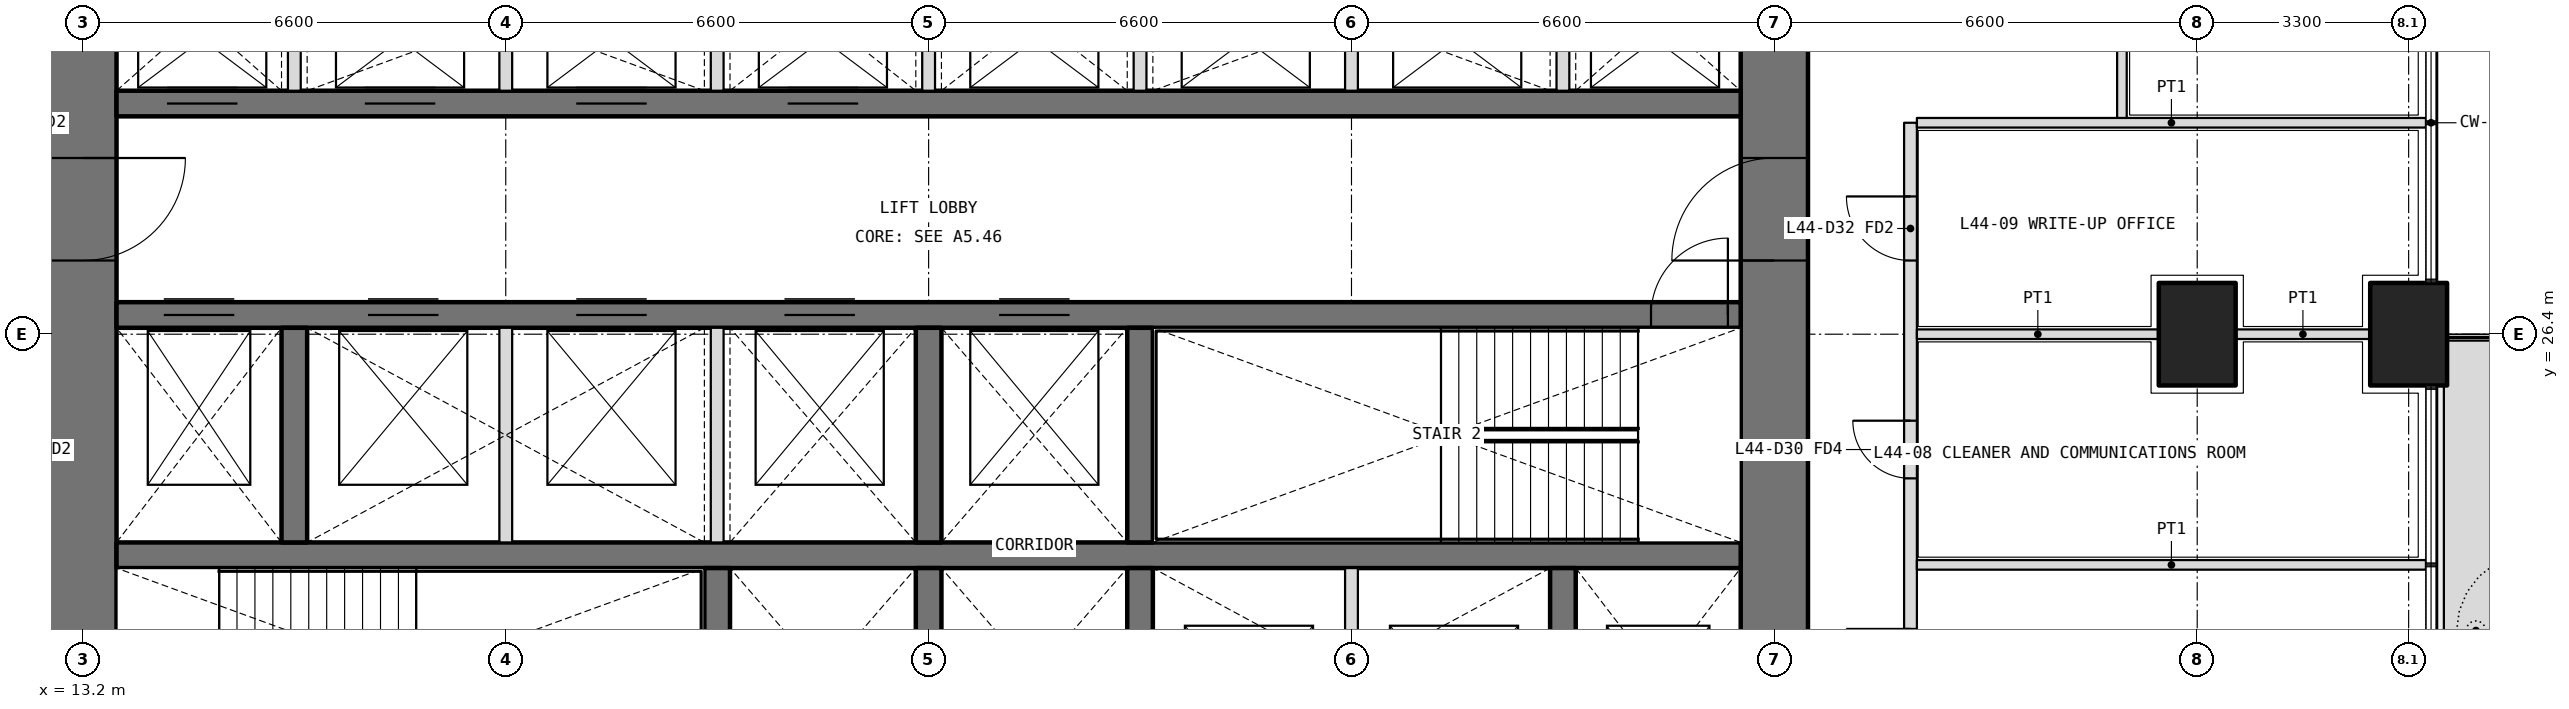
"""IFC4 building model, lengths in metres.
Left out: names, types, materials, properties, quantities, classifications, styles, units other than length and angle.
Written with IfcOpenShell. Run it as: python <this file> out.ifc"""

import sys

from ifc_helpers import new_model, si_unit, direction, frame, frame_2d, origin, origin_2d, place, context, subcontext, project, spatial, polyline, rectangle, outline, extrude, element, fill, save


model = new_model("IFC4")
c1 = context("Model", 3, precision=1e-05, world=origin(), true_north=direction((0.0, 1.0)))
c2 = subcontext(c1, "Body", "Model", "MODEL_VIEW")
j1 = project(units=[si_unit("LENGTHUNIT", "METRE"), si_unit("PLANEANGLEUNIT", "RADIAN")], contexts=[c1])
p1 = place(None, origin())
s1 = spatial("IfcSite", under=j1, at=p1, CompositionType="ELEMENT")
p2 = place(p1, origin())
s2 = spatial("IfcBuilding", under=s1, at=p2, CompositionType="ELEMENT")
p3 = place(p2, frame((0.0, 0.0, 193.5)))
s3 = spatial("IfcBuildingStorey", under=s2, at=p3, CompositionType="ELEMENT", Elevation=193.5)
for number, where, z_axis, x_axis in (
    (1, (49.5, 26.4, 0.0), (0.0, 0.0, 1.0), (0.0, 1.0, 0.0)),
    (2, (46.2, 26.4, 0.0), (0.0, 0.0, 1.0), (0.0, 1.0, 0.0)),
):
    element("IfcColumn", number, at=place(p3, frame(where, z_axis=z_axis, x_axis=x_axis)), inside=s3, PredefinedType="COLUMN", context=c2, shape_type="SweptSolid", body=[
        extrude(rectangle(XDim=1.6, YDim=1.2, at=origin_2d()), origin(), (0.0, 0.0, 1.0), 4.2),
    ])
p4 = place(p3, origin())
e3 = element("IfcWall", 3, at=p4, inside=s3, PredefinedType="USERDEFINED", context=c2, shape_type="SweptSolid", body=[
    extrude(outline(polyline([(50.05, 17.25), (51.05, 17.25), (51.05, 26.3), (50.05, 26.3), (50.05, 17.25)]), holes=[polyline([(50.2, 17.4), (50.9, 17.4), (50.9, 26.15), (50.2, 26.15), (50.2, 17.4)])]), origin(), (0.0, 0.0, 1.0), 1.05),
])
p5 = place(p3, frame((39.6, 13.725, 0.0), z_axis=(0.0, 0.0, 1.0), x_axis=(0.0, 1.0, 0.0)))
e4 = element("IfcWall", 4, at=p5, inside=s3, PredefinedType="SHEAR", context=c2, shape_type="SweptSolid", body=[
    extrude(rectangle(XDim=18.75, YDim=1.05, at=frame_2d((9.375, 0.0))), origin(), (0.0, 0.0, 1.0), 4.2),
])
p6 = place(p5, frame((3.025, 0.0, 0.0)))
e5 = element("IfcOpeningElement", 5, at=p6, cuts=e4, PredefinedType="OPENING", context=c2, shape_type="SweptSolid", body=[
    extrude(rectangle(XDim=1.6, YDim=2.1, at=frame_2d((0.8, 1.05))), frame((0.0, 0.535, 0.0), z_axis=(0.0, -1.0, 0.0), x_axis=(1.0, 0.0, 0.0)), (0.0, 0.0, 1.0), 1.07),
])
p7 = place(p5, frame((13.825, 0.0, 0.0)))
e6 = element("IfcOpeningElement", 6, at=p7, cuts=e4, PredefinedType="OPENING", context=c2, shape_type="SweptSolid", body=[
    extrude(rectangle(XDim=1.6, YDim=2.1, at=frame_2d((0.8, 1.05))), frame((0.0, 0.535, 0.0), z_axis=(0.0, -1.0, 0.0), x_axis=(1.0, 0.0, 0.0)), (0.0, 0.0, 1.0), 1.07),
])
p8 = place(p3, frame((13.2, 32.475, 0.0), z_axis=(0.0, 0.0, 1.0), x_axis=(0.0, -1.0, 0.0)))
e7 = element("IfcWall", 7, at=p8, inside=s3, PredefinedType="SHEAR", context=c2, shape_type="SweptSolid", body=[
    extrude(rectangle(XDim=18.75, YDim=1.05, at=frame_2d((9.375, 0.0))), origin(), (0.0, 0.0, 1.0), 4.2),
])
p9 = place(p8, frame((14.125, 0.0, 0.0)))
e8 = element("IfcOpeningElement", 8, at=p9, cuts=e7, PredefinedType="OPENING", context=c2, shape_type="SweptSolid", body=[
    extrude(rectangle(XDim=1.6, YDim=2.1, at=frame_2d((0.8, 1.05))), frame((0.0, 0.535, 0.0), z_axis=(0.0, -1.0, 0.0), x_axis=(1.0, 0.0, 0.0)), (0.0, 0.0, 1.0), 1.07),
])
p10 = place(p8, frame((3.325, 0.0, 0.0)))
e9 = element("IfcOpeningElement", 9, at=p10, cuts=e7, PredefinedType="OPENING", context=c2, shape_type="SweptSolid", body=[
    extrude(rectangle(XDim=1.6, YDim=2.1, at=frame_2d((0.8, 1.05))), frame((0.0, 0.535, 0.0), z_axis=(0.0, -1.0, 0.0), x_axis=(1.0, 0.0, 0.0)), (0.0, 0.0, 1.0), 1.07),
])
p11 = place(p3, frame((13.725, 22.95, 0.0), z_axis=(0.0, 0.0, 1.0), x_axis=(1.0, 0.0, 0.0)))
e10 = element("IfcWall", 10, at=p11, inside=s3, PredefinedType="SHEAR", context=c2, shape_type="SweptSolid", body=[
    extrude(rectangle(XDim=25.35, YDim=0.4, at=frame_2d((12.675, 0.0))), origin(), (0.0, 0.0, 1.0), 4.2),
])
p12 = place(p3, frame((13.725, 26.7, 0.0), z_axis=(0.0, 0.0, 1.0), x_axis=(1.0, 0.0, 0.0)))
e11 = element("IfcWall", 11, at=p12, inside=s3, PredefinedType="SHEAR", context=c2, shape_type="SweptSolid", body=[
    extrude(rectangle(XDim=25.35, YDim=0.4, at=frame_2d((12.675, 0.0))), origin(), (0.0, 0.0, 1.0), 4.2),
])
p13 = place(p12, frame((23.95, 0.0, 0.0)))
e12 = element("IfcOpeningElement", 12, at=p13, cuts=e11, PredefinedType="OPENING", context=c2, shape_type="SweptSolid", body=[
    extrude(rectangle(XDim=1.2, YDim=2.1, at=frame_2d((0.6, 1.05))), frame((0.0, 0.21, 0.0), z_axis=(0.0, -1.0, 0.0), x_axis=(1.0, 0.0, 0.0)), (0.0, 0.0, 1.0), 0.42),
])
p14 = place(p12, frame((0.738, 0.0, 0.0)))
e13 = element("IfcOpeningElement", 13, at=p14, cuts=e11, PredefinedType="OPENING", context=c2, shape_type="SweptSolid", body=[
    extrude(rectangle(XDim=1.1, YDim=2.1, at=frame_2d((0.55, 1.05))), frame((0.0, 0.21, 0.0), z_axis=(0.0, -1.0, 0.0), x_axis=(1.0, 0.0, 0.0)), (0.0, 0.0, 1.0), 0.42),
])
p15 = place(p12, frame((3.925, 0.0, 0.0)))
e14 = element("IfcOpeningElement", 14, at=p15, cuts=e11, PredefinedType="OPENING", context=c2, shape_type="SweptSolid", body=[
    extrude(rectangle(XDim=1.1, YDim=2.1, at=frame_2d((0.55, 1.05))), frame((0.0, 0.21, 0.0), z_axis=(0.0, -1.0, 0.0), x_axis=(1.0, 0.0, 0.0)), (0.0, 0.0, 1.0), 0.42),
])
p16 = place(p12, frame((7.175, 0.0, 0.0)))
e15 = element("IfcOpeningElement", 15, at=p16, cuts=e11, PredefinedType="OPENING", context=c2, shape_type="SweptSolid", body=[
    extrude(rectangle(XDim=1.1, YDim=2.1, at=frame_2d((0.55, 1.05))), frame((0.0, 0.21, 0.0), z_axis=(0.0, -1.0, 0.0), x_axis=(1.0, 0.0, 0.0)), (0.0, 0.0, 1.0), 0.42),
])
p17 = place(p12, frame((10.425, 0.0, 0.0)))
e16 = element("IfcOpeningElement", 16, at=p17, cuts=e11, PredefinedType="OPENING", context=c2, shape_type="SweptSolid", body=[
    extrude(rectangle(XDim=1.1, YDim=2.1, at=frame_2d((0.55, 1.05))), frame((0.0, 0.21, 0.0), z_axis=(0.0, -1.0, 0.0), x_axis=(1.0, 0.0, 0.0)), (0.0, 0.0, 1.0), 0.42),
])
p18 = place(p12, frame((13.775, 0.0, 0.0)))
e17 = element("IfcOpeningElement", 17, at=p18, cuts=e11, PredefinedType="OPENING", context=c2, shape_type="SweptSolid", body=[
    extrude(rectangle(XDim=1.1, YDim=2.1, at=frame_2d((0.55, 1.05))), frame((0.0, 0.21, 0.0), z_axis=(0.0, -1.0, 0.0), x_axis=(1.0, 0.0, 0.0)), (0.0, 0.0, 1.0), 0.42),
])
p19 = place(p3, frame((13.725, 30.0, 0.0), z_axis=(0.0, 0.0, 1.0), x_axis=(1.0, 0.0, 0.0)))
e18 = element("IfcWall", 18, at=p19, inside=s3, PredefinedType="SHEAR", context=c2, shape_type="SweptSolid", body=[
    extrude(rectangle(XDim=25.35, YDim=0.4, at=frame_2d((12.675, 0.0))), origin(), (0.0, 0.0, 1.0), 4.2),
])
p20 = place(p19, frame((0.788, 0.0, 0.0)))
e19 = element("IfcOpeningElement", 19, at=p20, cuts=e18, PredefinedType="OPENING", context=c2, shape_type="SweptSolid", body=[
    extrude(rectangle(XDim=1.1, YDim=2.1, at=frame_2d((0.55, 1.05))), frame((0.0, 0.21, 0.0), z_axis=(0.0, -1.0, 0.0), x_axis=(1.0, 0.0, 0.0)), (0.0, 0.0, 1.0), 0.42),
])
p21 = place(p19, frame((3.875, 0.0, 0.0)))
e20 = element("IfcOpeningElement", 20, at=p21, cuts=e18, PredefinedType="OPENING", context=c2, shape_type="SweptSolid", body=[
    extrude(rectangle(XDim=1.1, YDim=2.1, at=frame_2d((0.55, 1.05))), frame((0.0, 0.21, 0.0), z_axis=(0.0, -1.0, 0.0), x_axis=(1.0, 0.0, 0.0)), (0.0, 0.0, 1.0), 0.42),
])
p22 = place(p19, frame((7.175, 0.0, 0.0)))
e21 = element("IfcOpeningElement", 21, at=p22, cuts=e18, PredefinedType="OPENING", context=c2, shape_type="SweptSolid", body=[
    extrude(rectangle(XDim=1.1, YDim=2.1, at=frame_2d((0.55, 1.05))), frame((0.0, 0.21, 0.0), z_axis=(0.0, -1.0, 0.0), x_axis=(1.0, 0.0, 0.0)), (0.0, 0.0, 1.0), 0.42),
])
p23 = place(p19, frame((10.475, 0.0, 0.0)))
e22 = element("IfcOpeningElement", 22, at=p23, cuts=e18, PredefinedType="OPENING", context=c2, shape_type="SweptSolid", body=[
    extrude(rectangle(XDim=1.1, YDim=2.1, at=frame_2d((0.55, 1.05))), frame((0.0, 0.21, 0.0), z_axis=(0.0, -1.0, 0.0), x_axis=(1.0, 0.0, 0.0)), (0.0, 0.0, 1.0), 0.42),
])
for number, where, z_axis, x_axis in (
    (23, (23.1, 19.4, 0.0), (0.0, 0.0, 1.0), (0.0, 1.0, 0.0)),
    (24, (26.4, 19.4, 0.0), (0.0, 0.0, 1.0), (0.0, 1.0, 0.0)),
    (25, (29.7, 19.4, 0.0), (0.0, 0.0, 1.0), (0.0, 1.0, 0.0)),
    (26, (36.3, 19.4, 0.0), (0.0, 0.0, 1.0), (0.0, 1.0, 0.0)),
    (27, (16.5, 23.15, 0.0), (0.0, 0.0, 1.0), (0.0, 1.0, 0.0)),
    (28, (26.4, 23.15, 0.0), (0.0, 0.0, 1.0), (0.0, 1.0, 0.0)),
    (29, (29.7, 23.15, 0.0), (0.0, 0.0, 1.0), (0.0, 1.0, 0.0)),
):
    element("IfcWall", number, at=place(p3, frame(where, z_axis=z_axis, x_axis=x_axis)), inside=s3, PredefinedType="SHEAR", context=c2, shape_type="SweptSolid", body=[
        extrude(rectangle(XDim=3.35, YDim=0.4, at=frame_2d((1.675, 0.0))), origin(), (0.0, 0.0, 1.0), 4.2),
    ])
for number, where, z_axis, x_axis in (
    (30, (16.5, 30.2, 0.0), (0.0, 0.0, 1.0), (0.0, 1.0, 0.0)),
    (31, (19.8, 30.2, 0.0), (0.0, 0.0, 1.0), (0.0, 1.0, 0.0)),
    (32, (23.1, 30.2, 0.0), (0.0, 0.0, 1.0), (0.0, 1.0, 0.0)),
    (33, (26.4, 30.2, 0.0), (0.0, 0.0, 1.0), (0.0, 1.0, 0.0)),
    (34, (29.7, 30.2, 0.0), (0.0, 0.0, 1.0), (0.0, 1.0, 0.0)),
    (35, (33.0, 30.2, 0.0), (0.0, 0.0, 1.0), (0.0, 1.0, 0.0)),
    (36, (36.3, 30.2, 0.0), (0.0, 0.0, 1.0), (0.0, 1.0, 0.0)),
):
    element("IfcWall", number, at=place(p3, frame(where, z_axis=z_axis, x_axis=x_axis)), inside=s3, PredefinedType="PARTITIONING", context=c2, shape_type="SweptSolid", body=[
        extrude(rectangle(XDim=2.275, YDim=0.2, at=frame_2d((1.138, 0.0))), origin(), (0.0, 0.0, 1.0), 4.2),
    ])
for number, where, z_axis, x_axis in (
    (37, (33.0, 19.4, 0.0), (0.0, 0.0, 1.0), (0.0, 1.0, 0.0)),
    (38, (19.8, 23.15, 0.0), (0.0, 0.0, 1.0), (0.0, 1.0, 0.0)),
    (39, (23.1, 23.15, 0.0), (0.0, 0.0, 1.0), (0.0, 1.0, 0.0)),
):
    element("IfcWall", number, at=place(p3, frame(where, z_axis=z_axis, x_axis=x_axis)), inside=s3, PredefinedType="PARTITIONING", context=c2, shape_type="SweptSolid", body=[
        extrude(rectangle(XDim=3.35, YDim=0.2, at=frame_2d((1.675, 0.0))), origin(), (0.0, 0.0, 1.0), 4.2),
    ])
p24 = place(p3, frame((41.725, 11.175, 0.0), z_axis=(0.0, 0.0, 1.0), x_axis=(0.0, 1.0, 0.0)))
e40 = element("IfcWall", 40, at=p24, inside=s3, PredefinedType="PARTITIONING", context=c2, shape_type="SweptSolid", body=[
    extrude(rectangle(XDim=18.525, YDim=0.2, at=frame_2d((9.262, 0.0))), origin(), (0.0, 0.0, 1.0), 2.85),
])
p25 = place(p24, frame((2.113, 0.0, 0.0)))
e41 = element("IfcOpeningElement", 41, at=p25, cuts=e40, PredefinedType="OPENING", context=c2, shape_type="SweptSolid", body=[
    extrude(rectangle(XDim=1.0, YDim=2.1, at=frame_2d((0.5, 1.05))), frame((0.0, 0.11, 0.0), z_axis=(0.0, -1.0, 0.0), x_axis=(1.0, 0.0, 0.0)), (0.0, 0.0, 1.0), 0.22),
])
p26 = place(p24, frame((6.375, 0.0, 0.0)))
e42 = element("IfcOpeningElement", 42, at=p26, cuts=e40, PredefinedType="OPENING", context=c2, shape_type="SweptSolid", body=[
    extrude(rectangle(XDim=1.2, YDim=2.1, at=frame_2d((0.6, 1.05))), frame((0.0, 0.11, 0.0), z_axis=(0.0, -1.0, 0.0), x_axis=(1.0, 0.0, 0.0)), (0.0, 0.0, 1.0), 0.22),
])
p27 = place(p24, frame((9.625, 0.0, 0.0)))
e43 = element("IfcOpeningElement", 43, at=p27, cuts=e40, PredefinedType="OPENING", context=c2, shape_type="SweptSolid", body=[
    extrude(rectangle(XDim=1.0, YDim=2.1, at=frame_2d((0.5, 1.05))), frame((0.0, 0.11, 0.0), z_axis=(0.0, -1.0, 0.0), x_axis=(1.0, 0.0, 0.0)), (0.0, 0.0, 1.0), 0.22),
])
p28 = place(p24, frame((12.975, 0.0, 0.0)))
e44 = element("IfcOpeningElement", 44, at=p28, cuts=e40, PredefinedType="OPENING", context=c2, shape_type="SweptSolid", body=[
    extrude(rectangle(XDim=0.9, YDim=2.1, at=frame_2d((0.45, 1.05))), frame((0.0, 0.11, 0.0), z_axis=(0.0, -1.0, 0.0), x_axis=(1.0, 0.0, 0.0)), (0.0, 0.0, 1.0), 0.22),
])
p29 = place(p24, frame((16.375, 0.0, 0.0)))
e45 = element("IfcOpeningElement", 45, at=p29, cuts=e40, PredefinedType="OPENING", context=c2, shape_type="SweptSolid", body=[
    extrude(rectangle(XDim=1.0, YDim=2.1, at=frame_2d((0.5, 1.05))), frame((0.0, 0.11, 0.0), z_axis=(0.0, -1.0, 0.0), x_axis=(1.0, 0.0, 0.0)), (0.0, 0.0, 1.0), 0.22),
])
p30 = place(p3, frame((49.77, 22.8, 0.0), z_axis=(0.0, 0.0, 1.0), x_axis=(-1.0, 0.0, 0.0)))
e46 = element("IfcWall", 46, at=p30, inside=s3, PredefinedType="PARTITIONING", context=c2, shape_type="SweptSolid", body=[
    extrude(rectangle(XDim=7.945, YDim=0.15, at=frame_2d((3.973, 0.0))), origin(), (0.0, 0.0, 1.0), 2.7),
])
p31 = place(p3, frame((48.9, 26.4, 0.0), z_axis=(0.0, 0.0, 1.0), x_axis=(-1.0, 0.0, 0.0)))
e47 = element("IfcWall", 47, at=p31, inside=s3, PredefinedType="PARTITIONING", context=c2, shape_type="SweptSolid", body=[
    extrude(rectangle(XDim=2.1, YDim=0.15, at=frame_2d((1.05, 0.0))), origin(), (0.0, 0.0, 1.0), 2.85),
])
p32 = place(p3, frame((45.6, 26.4, 0.0), z_axis=(0.0, 0.0, 1.0), x_axis=(-1.0, 0.0, 0.0)))
e48 = element("IfcWall", 48, at=p32, inside=s3, PredefinedType="PARTITIONING", context=c2, shape_type="SweptSolid", body=[
    extrude(rectangle(XDim=3.775, YDim=0.15, at=frame_2d((1.888, 0.0))), origin(), (0.0, 0.0, 1.0), 2.85),
])
p33 = place(p3, frame((45.025, 29.7, 0.0), z_axis=(0.0, 0.0, 1.0), x_axis=(0.0, 1.0, 0.0)))
e49 = element("IfcWall", 49, at=p33, inside=s3, PredefinedType="PARTITIONING", context=c2, shape_type="SweptSolid", body=[
    extrude(rectangle(XDim=3.3, YDim=0.15, at=frame_2d((1.65, 0.0))), origin(), (0.0, 0.0, 1.0), 2.85),
])
p34 = place(p33, frame((1.15, 0.0, 0.0)))
e50 = element("IfcOpeningElement", 50, at=p34, cuts=e49, PredefinedType="OPENING", context=c2, shape_type="SweptSolid", body=[
    extrude(rectangle(XDim=1.0, YDim=2.1, at=frame_2d((0.5, 1.05))), frame((0.0, 0.085, 0.0), z_axis=(0.0, -1.0, 0.0), x_axis=(1.0, 0.0, 0.0)), (0.0, 0.0, 1.0), 0.17),
])
p35 = place(p3, frame((49.77, 29.7, 0.0), z_axis=(0.0, 0.0, 1.0), x_axis=(-1.0, 0.0, 0.0)))
e51 = element("IfcWall", 51, at=p35, inside=s3, PredefinedType="PARTITIONING", context=c2, shape_type="SweptSolid", body=[
    extrude(rectangle(XDim=7.945, YDim=0.15, at=frame_2d((3.973, 0.0))), origin(), (0.0, 0.0, 1.0), 2.7),
])
p36 = place(p28, origin())
e52 = element("IfcDoor", 52, at=p36, inside=s3, OperationType="SINGLE_SWING_RIGHT", PredefinedType="DOOR", context=c2, shape_type="SweptSolid", body=[
    extrude(rectangle(XDim=0.9, YDim=2.1, at=frame_2d((0.45, 1.05))), frame((0.0, 0.025, 0.0), z_axis=(0.0, -1.0, 0.0), x_axis=(1.0, 0.0, 0.0)), (0.0, 0.0, 1.0), 0.05),
])
fill(e44, e52)
p37 = place(p29, origin())
e53 = element("IfcDoor", 53, at=p37, inside=s3, OperationType="SINGLE_SWING_RIGHT", PredefinedType="DOOR", context=c2, shape_type="SweptSolid", body=[
    extrude(rectangle(XDim=1.0, YDim=2.1, at=frame_2d((0.5, 1.05))), frame((0.0, 0.025, 0.0), z_axis=(0.0, -1.0, 0.0), x_axis=(1.0, 0.0, 0.0)), (0.0, 0.0, 1.0), 0.05),
])
fill(e45, e53)
p38 = place(p13, origin())
e54 = element("IfcDoor", 54, at=p38, inside=s3, OperationType="SINGLE_SWING_RIGHT", PredefinedType="DOOR", context=c2, shape_type="SweptSolid", body=[
    extrude(rectangle(XDim=1.2, YDim=2.1, at=frame_2d((0.6, 1.05))), frame((0.0, 0.025, 0.0), z_axis=(0.0, -1.0, 0.0), x_axis=(1.0, 0.0, 0.0)), (0.0, 0.0, 1.0), 0.05),
])
fill(e12, e54)
p39 = place(p10, origin())
e55 = element("IfcDoor", 55, at=p39, inside=s3, OperationType="DOUBLE_DOOR_DOUBLE_SWING", PredefinedType="DOOR", context=c2, shape_type="SweptSolid", body=[
    extrude(rectangle(XDim=1.6, YDim=2.1, at=frame_2d((0.8, 1.05))), frame((0.0, 0.025, 0.0), z_axis=(0.0, -1.0, 0.0), x_axis=(1.0, 0.0, 0.0)), (0.0, 0.0, 1.0), 0.05),
])
fill(e9, e55)
p40 = place(p7, origin())
e56 = element("IfcDoor", 56, at=p40, inside=s3, OperationType="DOUBLE_DOOR_DOUBLE_SWING", PredefinedType="DOOR", context=c2, shape_type="SweptSolid", body=[
    extrude(rectangle(XDim=1.6, YDim=2.1, at=frame_2d((0.8, 1.05))), frame((0.0, 0.025, 0.0), z_axis=(0.0, -1.0, 0.0), x_axis=(1.0, 0.0, 0.0)), (0.0, 0.0, 1.0), 0.05),
])
fill(e6, e56)
p41 = place(p20, origin())
e57 = element("IfcDoor", 57, at=p41, inside=s3, OperationType="DOUBLE_DOOR_SLIDING", PredefinedType="DOOR", context=c2, shape_type="SweptSolid", body=[
    extrude(rectangle(XDim=1.1, YDim=2.1, at=frame_2d((0.55, 1.05))), frame((0.0, 0.025, 0.0), z_axis=(0.0, -1.0, 0.0), x_axis=(1.0, 0.0, 0.0)), (0.0, 0.0, 1.0), 0.05),
])
fill(e19, e57)
p42 = place(p21, origin())
e58 = element("IfcDoor", 58, at=p42, inside=s3, OperationType="DOUBLE_DOOR_SLIDING", PredefinedType="DOOR", context=c2, shape_type="SweptSolid", body=[
    extrude(rectangle(XDim=1.1, YDim=2.1, at=frame_2d((0.55, 1.05))), frame((0.0, 0.025, 0.0), z_axis=(0.0, -1.0, 0.0), x_axis=(1.0, 0.0, 0.0)), (0.0, 0.0, 1.0), 0.05),
])
fill(e20, e58)
p43 = place(p22, origin())
e59 = element("IfcDoor", 59, at=p43, inside=s3, OperationType="DOUBLE_DOOR_SLIDING", PredefinedType="DOOR", context=c2, shape_type="SweptSolid", body=[
    extrude(rectangle(XDim=1.1, YDim=2.1, at=frame_2d((0.55, 1.05))), frame((0.0, 0.025, 0.0), z_axis=(0.0, -1.0, 0.0), x_axis=(1.0, 0.0, 0.0)), (0.0, 0.0, 1.0), 0.05),
])
fill(e21, e59)
p44 = place(p23, origin())
e60 = element("IfcDoor", 60, at=p44, inside=s3, OperationType="DOUBLE_DOOR_SLIDING", PredefinedType="DOOR", context=c2, shape_type="SweptSolid", body=[
    extrude(rectangle(XDim=1.1, YDim=2.1, at=frame_2d((0.55, 1.05))), frame((0.0, 0.025, 0.0), z_axis=(0.0, -1.0, 0.0), x_axis=(1.0, 0.0, 0.0)), (0.0, 0.0, 1.0), 0.05),
])
fill(e22, e60)
p45 = place(p14, origin())
e61 = element("IfcDoor", 61, at=p45, inside=s3, OperationType="DOUBLE_DOOR_SLIDING", PredefinedType="DOOR", context=c2, shape_type="SweptSolid", body=[
    extrude(rectangle(XDim=1.1, YDim=2.1, at=frame_2d((0.55, 1.05))), frame((0.0, 0.025, 0.0), z_axis=(0.0, -1.0, 0.0), x_axis=(1.0, 0.0, 0.0)), (0.0, 0.0, 1.0), 0.05),
])
fill(e13, e61)
p46 = place(p15, origin())
e62 = element("IfcDoor", 62, at=p46, inside=s3, OperationType="DOUBLE_DOOR_SLIDING", PredefinedType="DOOR", context=c2, shape_type="SweptSolid", body=[
    extrude(rectangle(XDim=1.1, YDim=2.1, at=frame_2d((0.55, 1.05))), frame((0.0, 0.025, 0.0), z_axis=(0.0, -1.0, 0.0), x_axis=(1.0, 0.0, 0.0)), (0.0, 0.0, 1.0), 0.05),
])
fill(e14, e62)
p47 = place(p16, origin())
e63 = element("IfcDoor", 63, at=p47, inside=s3, OperationType="DOUBLE_DOOR_SLIDING", PredefinedType="DOOR", context=c2, shape_type="SweptSolid", body=[
    extrude(rectangle(XDim=1.1, YDim=2.1, at=frame_2d((0.55, 1.05))), frame((0.0, 0.025, 0.0), z_axis=(0.0, -1.0, 0.0), x_axis=(1.0, 0.0, 0.0)), (0.0, 0.0, 1.0), 0.05),
])
fill(e15, e63)
p48 = place(p17, origin())
e64 = element("IfcDoor", 64, at=p48, inside=s3, OperationType="DOUBLE_DOOR_SLIDING", PredefinedType="DOOR", context=c2, shape_type="SweptSolid", body=[
    extrude(rectangle(XDim=1.1, YDim=2.1, at=frame_2d((0.55, 1.05))), frame((0.0, 0.025, 0.0), z_axis=(0.0, -1.0, 0.0), x_axis=(1.0, 0.0, 0.0)), (0.0, 0.0, 1.0), 0.05),
])
fill(e16, e64)
p49 = place(p18, origin())
e65 = element("IfcDoor", 65, at=p49, inside=s3, OperationType="DOUBLE_DOOR_SLIDING", PredefinedType="DOOR", context=c2, shape_type="SweptSolid", body=[
    extrude(rectangle(XDim=1.1, YDim=2.1, at=frame_2d((0.55, 1.05))), frame((0.0, 0.025, 0.0), z_axis=(0.0, -1.0, 0.0), x_axis=(1.0, 0.0, 0.0)), (0.0, 0.0, 1.0), 0.05),
])
fill(e17, e65)
save(model, sys.argv[1])
